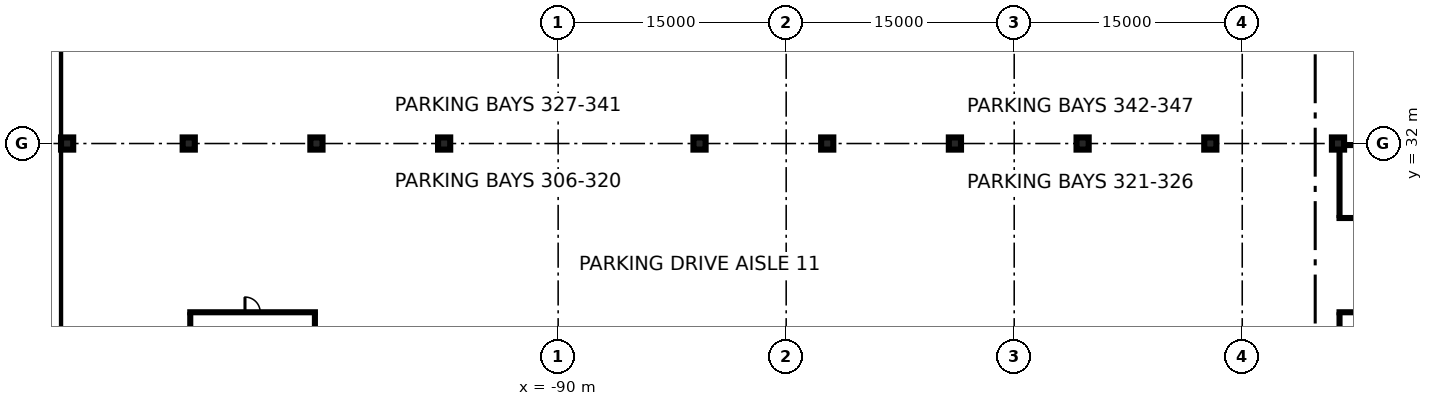
"""IFC4 building model, lengths in metres.
Left out: names, types, materials, properties, quantities, classifications, styles, units other than length and angle.
Written with IfcOpenShell. Run it as: python <this file> out.ifc"""

import sys

from ifc_helpers import new_model, si_unit, direction, frame, frame_2d, origin, origin_2d, place, context, subcontext, project, spatial, rectangle, extrude, element, fill, save


model = new_model("IFC4")
c1 = context("Model", 3, precision=1e-05, world=origin(), true_north=direction((0.0, 1.0)))
c2 = subcontext(c1, "Body", "Model", "MODEL_VIEW")
j1 = project(units=[si_unit("LENGTHUNIT", "METRE"), si_unit("PLANEANGLEUNIT", "RADIAN")], contexts=[c1])
p1 = place(None, origin())
s1 = spatial("IfcSite", under=j1, at=p1, CompositionType="ELEMENT")
p2 = place(p1, origin())
s2 = spatial("IfcBuilding", under=s1, at=p2, CompositionType="ELEMENT")
p3 = place(p2, frame((0.0, 0.0, -12.0)))
s3 = spatial("IfcBuildingStorey", under=s2, at=p3, CompositionType="ELEMENT", Elevation=-12.0)
p4 = place(p3, frame((-123.15, -80.0, 0.0), z_axis=(0.0, 0.0, 1.0), x_axis=(0.0, 1.0, 0.0)))
e1 = element("IfcWall", 1, at=p4, inside=s3, PredefinedType="USERDEFINED", context=c2, shape_type="SweptSolid", body=[
    extrude(rectangle(XDim=160.0, YDim=0.9, at=frame_2d((80.0, 0.0))), origin(), (0.0, 0.0, 1.0), 11.55),
])
p5 = place(p2, frame((0.0, 0.0, -3.6)))
s4 = spatial("IfcBuildingStorey", under=s2, at=p5, CompositionType="ELEMENT", Elevation=-3.6)
for number, where, z_axis, x_axis in (
    (2, (-122.3, 32.0, -0.4), (0.0, 0.0, 1.0), (1.0, 0.0, 0.0)),
    (3, (-114.3, 32.0, -0.4), (0.0, 0.0, 1.0), (1.0, 0.0, 0.0)),
    (4, (-105.9, 32.0, -0.4), (0.0, 0.0, 1.0), (1.0, 0.0, 0.0)),
    (5, (-97.5, 32.0, -0.4), (0.0, 0.0, 1.0), (1.0, 0.0, 0.0)),
    (6, (-80.7, 32.0, -0.4), (0.0, 0.0, 1.0), (1.0, 0.0, 0.0)),
    (7, (-72.3, 32.0, -0.4), (0.0, 0.0, 1.0), (1.0, 0.0, 0.0)),
    (8, (-63.9, 32.0, -0.4), (0.0, 0.0, 1.0), (1.0, 0.0, 0.0)),
    (9, (-55.5, 32.0, -0.4), (0.0, 0.0, 1.0), (1.0, 0.0, 0.0)),
    (10, (-47.1, 32.0, -0.4), (0.0, 0.0, 1.0), (1.0, 0.0, 0.0)),
    (11, (-38.7, 32.0, -0.4), (0.0, 0.0, 1.0), (1.0, 0.0, 0.0)),
):
    element("IfcColumn", number, at=place(p5, frame(where, z_axis=z_axis, x_axis=x_axis)), inside=s4, PredefinedType="COLUMN", context=c2, shape_type="SweptSolid", body=[
        extrude(rectangle(XDim=0.8, YDim=0.8, at=origin_2d()), origin(), (0.0, 0.0, 1.0), 3.55),
    ])
p6 = place(p5, frame((-38.7, 20.9, 0.0), z_axis=(0.0, 0.0, 1.0), x_axis=(1.0, 0.0, 0.0)))
e12 = element("IfcWall", 12, at=p6, inside=s4, PredefinedType="PARTITIONING", context=c2, shape_type="SweptSolid", body=[
    extrude(rectangle(XDim=7.423, YDim=0.2, at=frame_2d((3.712, 0.0))), origin(), (0.0, 0.0, 1.0), 3.15),
])
p7 = place(p6, frame((3.212, 0.0, 0.0)))
e13 = element("IfcOpeningElement", 13, at=p7, cuts=e12, PredefinedType="OPENING", context=c2, shape_type="SweptSolid", body=[
    extrude(rectangle(XDim=1.0, YDim=2.1, at=frame_2d((0.5, 1.05))), frame((0.0, 0.11, 0.0), z_axis=(0.0, -1.0, 0.0), x_axis=(1.0, 0.0, 0.0)), (0.0, 0.0, 1.0), 0.22),
])
p8 = place(p5, frame((-38.6, 16.6, 0.0), z_axis=(0.0, 0.0, 1.0), x_axis=(0.0, 1.0, 0.0)))
e14 = element("IfcWall", 14, at=p8, inside=s4, PredefinedType="PARTITIONING", context=c2, shape_type="SweptSolid", body=[
    extrude(rectangle(XDim=4.2, YDim=0.2, at=frame_2d((2.1, 0.0))), origin(), (0.0, 0.0, 1.0), 3.15),
])
p9 = place(p5, frame((-38.7, 27.1, 0.0), z_axis=(0.0, 0.0, 1.0), x_axis=(1.0, 0.0, 0.0)))
e15 = element("IfcWall", 15, at=p9, inside=s4, PredefinedType="PARTITIONING", context=c2, shape_type="SweptSolid", body=[
    extrude(rectangle(XDim=6.012, YDim=0.2, at=frame_2d((3.006, 0.0))), origin(), (0.0, 0.0, 1.0), 3.15),
])
p10 = place(p9, frame((2.506, 0.0, 0.0)))
e16 = element("IfcOpeningElement", 16, at=p10, cuts=e15, PredefinedType="OPENING", context=c2, shape_type="SweptSolid", body=[
    extrude(rectangle(XDim=1.0, YDim=2.1, at=frame_2d((0.5, 1.05))), frame((0.0, 0.11, 0.0), z_axis=(0.0, -1.0, 0.0), x_axis=(1.0, 0.0, 0.0)), (0.0, 0.0, 1.0), 0.22),
])
p11 = place(p5, frame((-38.7, 31.9, 0.0), z_axis=(0.0, 0.0, 1.0), x_axis=(1.0, 0.0, 0.0)))
e17 = element("IfcWall", 17, at=p11, inside=s4, PredefinedType="PARTITIONING", context=c2, shape_type="SweptSolid", body=[
    extrude(rectangle(XDim=6.012, YDim=0.2, at=frame_2d((3.006, 0.0))), origin(), (0.0, 0.0, 1.0), 3.15),
])
p12 = place(p5, frame((-38.6, 27.2, 0.0), z_axis=(0.0, 0.0, 1.0), x_axis=(0.0, 1.0, 0.0)))
e18 = element("IfcWall", 18, at=p12, inside=s4, PredefinedType="PARTITIONING", context=c2, shape_type="SweptSolid", body=[
    extrude(rectangle(XDim=4.4, YDim=0.2, at=frame_2d((2.2, 0.0))), origin(), (0.0, 0.0, 1.0), 3.15),
])
p13 = place(p5, frame((-114.3, 20.9, 0.0), z_axis=(0.0, 0.0, 1.0), x_axis=(1.0, 0.0, 0.0)))
e19 = element("IfcWall", 19, at=p13, inside=s4, PredefinedType="PARTITIONING", context=c2, shape_type="SweptSolid", body=[
    extrude(rectangle(XDim=8.4, YDim=0.2, at=frame_2d((4.2, 0.0))), origin(), (0.0, 0.0, 1.0), 3.15),
])
p14 = place(p13, frame((3.7, 0.0, 0.0)))
e20 = element("IfcOpeningElement", 20, at=p14, cuts=e19, PredefinedType="OPENING", context=c2, shape_type="SweptSolid", body=[
    extrude(rectangle(XDim=1.0, YDim=2.1, at=frame_2d((0.5, 1.05))), frame((0.0, 0.11, 0.0), z_axis=(0.0, -1.0, 0.0), x_axis=(1.0, 0.0, 0.0)), (0.0, 0.0, 1.0), 0.22),
])
for number, where, z_axis, x_axis in (
    (21, (-114.2, 16.4, 0.0), (0.0, 0.0, 1.0), (0.0, 1.0, 0.0)),
    (22, (-106.0, 16.4, 0.0), (0.0, 0.0, 1.0), (0.0, 1.0, 0.0)),
):
    element("IfcWall", number, at=place(p5, frame(where, z_axis=z_axis, x_axis=x_axis)), inside=s4, PredefinedType="PARTITIONING", context=c2, shape_type="SweptSolid", body=[
        extrude(rectangle(XDim=4.4, YDim=0.2, at=frame_2d((2.2, 0.0))), origin(), (0.0, 0.0, 1.0), 3.15),
    ])
p15 = place(p14, origin())
e23 = element("IfcDoor", 23, at=p15, inside=s4, OperationType="SINGLE_SWING_LEFT", PredefinedType="DOOR", context=c2, shape_type="SweptSolid", body=[
    extrude(rectangle(XDim=1.0, YDim=2.1, at=frame_2d((0.5, 1.05))), frame((0.0, 0.025, 0.0), z_axis=(0.0, -1.0, 0.0), x_axis=(1.0, 0.0, 0.0)), (0.0, 0.0, 1.0), 0.05),
])
fill(e20, e23)
save(model, sys.argv[1])
